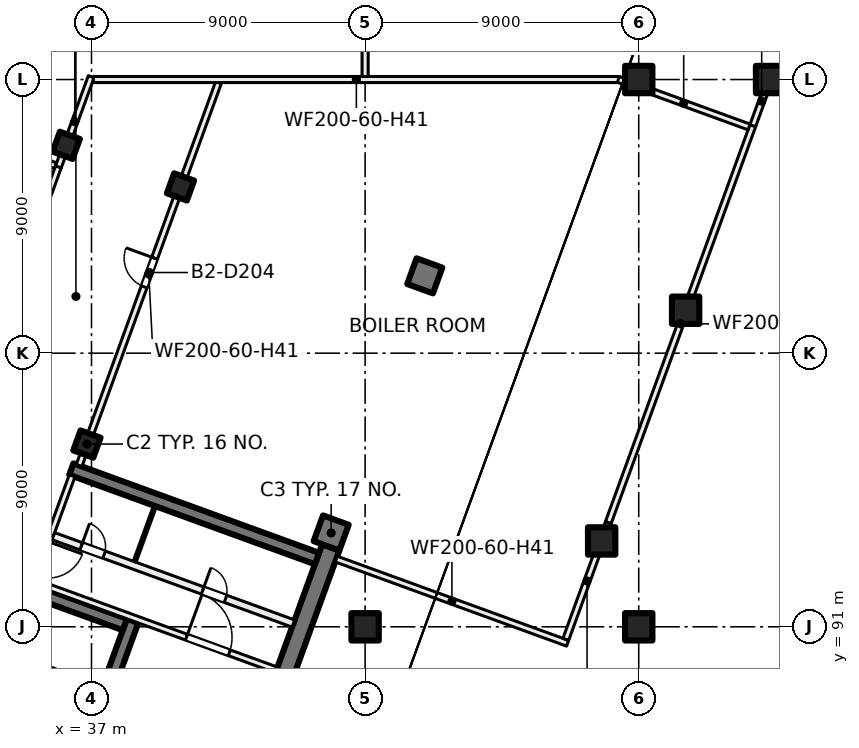
"""IFC4 building model, lengths in metres.
Left out: names, types, materials, properties, quantities, classifications, styles, units other than length and angle.
Written with IfcOpenShell. Run it as: python <this file> out.ifc"""

import sys

from ifc_helpers import new_model, si_unit, direction, frame, frame_2d, origin, origin_2d, place, context, subcontext, project, spatial, rectangle, extrude, element, fill, save


model = new_model("IFC4")
c1 = context("Model", 3, precision=1e-05, world=origin(), true_north=direction((0.0, 1.0)))
c2 = subcontext(c1, "Body", "Model", "MODEL_VIEW")
j1 = project(units=[si_unit("LENGTHUNIT", "METRE"), si_unit("PLANEANGLEUNIT", "RADIAN")], contexts=[c1])
p1 = place(None, origin())
s1 = spatial("IfcSite", under=j1, at=p1, CompositionType="ELEMENT")
p2 = place(p1, origin())
s2 = spatial("IfcBuilding", under=s1, at=p2, CompositionType="ELEMENT")
p3 = place(p2, frame((0.0, 0.0, -9.0)))
s3 = spatial("IfcBuildingStorey", under=s2, at=p3, CompositionType="ELEMENT", Elevation=-9.0)
p4 = place(p3, frame((110.368, 100.798, 0.0), z_axis=(0.0, 0.0, 1.0), x_axis=(-0.866702553925, -0.498825303107, 0.0)))
e1 = element("IfcWall", 1, at=p4, inside=s3, PredefinedType="SHEAR", context=c2, shape_type="SweptSolid", body=[
    extrude(rectangle(XDim=66.651, YDim=0.6, at=frame_2d((33.325, 0.0))), origin(), (0.0, 0.0, 1.0), 4.5),
])
for number, where, z_axis, x_axis in (
    (2, (46.0, 91.0, 0.0), (0.0, 0.0, 1.0), (1.0, 0.0, 0.0)),
    (3, (55.0, 91.0, 0.0), (0.0, 0.0, 1.0), (1.0, 0.0, 0.0)),
    (4, (55.0, 109.0, 0.0), (0.0, 0.0, 1.0), (1.0, 0.0, 0.0)),
    (5, (53.78, 93.824, 0.0), (0.0, 0.0, 1.0), (1.0, 0.0, 0.0)),
    (6, (56.542, 101.412, 0.0), (0.0, 0.0, 1.0), (1.0, 0.0, 0.0)),
    (7, (59.304, 109.0, 0.0), (0.0, 0.0, 1.0), (1.0, 0.0, 0.0)),
):
    element("IfcColumn", number, at=place(p3, frame(where, z_axis=z_axis, x_axis=x_axis)), inside=s3, PredefinedType="COLUMN", context=c2, shape_type="SweptSolid", body=[
        extrude(rectangle(XDim=0.9, YDim=0.9, at=origin_2d()), origin(), (0.0, 0.0, 1.0), 4.5),
    ])
for number, where, z_axis, x_axis in (
    (8, (39.927, 105.468, 0.0), (0.0, 0.0, 1.0), (-0.342, -0.94, 0.0)),
    (9, (36.849, 97.011, 0.0), (0.0, 0.0, 1.0), (-0.342, -0.94, 0.0)),
    (10, (36.169, 106.836, 0.0), (0.0, 0.0, 1.0), (-0.342, -0.94, 0.0)),
):
    element("IfcColumn", number, at=place(p3, frame(where, z_axis=z_axis, x_axis=x_axis)), inside=s3, PredefinedType="COLUMN", context=c2, shape_type="SweptSolid", body=[
        extrude(rectangle(XDim=0.7, YDim=0.7, at=origin_2d()), origin(), (0.0, 0.0, 1.0), 4.5),
    ])
for number, where, z_axis, x_axis in (
    (11, (47.962, 102.544, 0.0), (0.0, 0.0, 1.0), (-0.342, -0.94, 0.0)),
    (12, (44.884, 94.087, 0.0), (0.0, 0.0, 1.0), (-0.342, -0.94, 0.0)),
):
    element("IfcColumn", number, at=place(p3, frame(where, z_axis=z_axis, x_axis=x_axis)), inside=s3, PredefinedType="COLUMN", context=c2, shape_type="SweptSolid", body=[
        extrude(rectangle(XDim=0.9, YDim=0.9, at=origin_2d()), origin(), (0.0, 0.0, 1.0), 4.5),
    ])
p5 = place(p3, frame((41.827, 85.249, 0.0), z_axis=(0.0, 0.0, 1.0), x_axis=(0.342016162452, 0.939694069696, 0.0)))
e13 = element("IfcWall", 13, at=p5, inside=s3, PredefinedType="SHEAR", context=c2, shape_type="SweptSolid", body=[
    extrude(rectangle(XDim=8.9, YDim=0.6, at=frame_2d((4.45, 0.0))), origin(), (0.0, 0.0, 1.0), 4.5),
])
p6 = place(p3, frame((34.178, 79.732, 0.0), z_axis=(0.0, 0.0, 1.0), x_axis=(0.342014590177, 0.939694641948, 0.0)))
e14 = element("IfcWall", 14, at=p6, inside=s3, PredefinedType="SHEAR", context=c2, shape_type="SweptSolid", body=[
    extrude(rectangle(XDim=12.2, YDim=0.4, at=frame_2d((6.1, 0.0))), origin(), (0.0, 0.0, 1.0), 4.5),
])
p7 = place(p3, frame((37.274, 88.822, 0.0), z_axis=(0.0, 0.0, 1.0), x_axis=(-0.939686455819, 0.342037080957, 0.0)))
e15 = element("IfcWall", 15, at=p7, inside=s3, PredefinedType="SHEAR", context=c2, shape_type="SweptSolid", body=[
    extrude(rectangle(XDim=3.0, YDim=0.4, at=frame_2d((1.5, 0.0))), origin(), (0.0, 0.0, 1.0), 4.5),
])
p8 = place(p3, frame((38.095, 91.077, 0.0), z_axis=(0.0, 0.0, 1.0), x_axis=(-0.939676934218, 0.342063238742, 0.0)))
e16 = element("IfcWall", 16, at=p8, inside=s3, PredefinedType="SHEAR", context=c2, shape_type="SweptSolid", body=[
    extrude(rectangle(XDim=3.0, YDim=0.4, at=frame_2d((1.5, 0.0))), origin(), (0.0, 0.0, 1.0), 4.5),
])
p9 = place(p3, frame((44.418, 93.245, 0.0), z_axis=(0.0, 0.0, 1.0), x_axis=(-0.93969060187, 0.342025690201, 0.0)))
e17 = element("IfcWall", 17, at=p9, inside=s3, PredefinedType="SHEAR", context=c2, shape_type="SweptSolid", body=[
    extrude(rectangle(XDim=8.6, YDim=0.4, at=frame_2d((4.3, 0.0))), origin(), (0.0, 0.0, 1.0), 4.5),
])
p10 = place(p3, frame((36.362, 95.964, 0.0), z_axis=(0.0, 0.0, 1.0), x_axis=(-0.341995824804, -0.939701471648, 0.0)))
e18 = element("IfcWall", 18, at=p10, inside=s3, PredefinedType="PARTITIONING", context=c2, shape_type="SweptSolid", body=[
    extrude(rectangle(XDim=3.8, YDim=0.2, at=frame_2d((1.9, 0.0))), origin(), (0.0, 0.0, 1.0), 4.125),
])
p11 = place(p10, frame((2.3, 0.0, 0.0)))
e19 = element("IfcOpeningElement", 19, at=p11, cuts=e18, PredefinedType="OPENING", context=c2, shape_type="SweptSolid", body=[
    extrude(rectangle(XDim=1.2, YDim=2.1, at=frame_2d((0.6, 1.05))), frame((0.0, 0.11, 0.0), z_axis=(0.0, -1.0, 0.0), x_axis=(1.0, 0.0, 0.0)), (0.0, 0.0, 1.0), 0.22),
])
p12 = place(p3, frame((35.19, 92.453, 0.0), z_axis=(0.0, 0.0, 1.0), x_axis=(0.939691552312, -0.342023078919, 0.0)))
e20 = element("IfcWall", 20, at=p12, inside=s3, PredefinedType="PARTITIONING", context=c2, shape_type="SweptSolid", body=[
    extrude(rectangle(XDim=8.4, YDim=0.2, at=frame_2d((4.2, 0.0))), origin(), (0.0, 0.0, 1.0), 4.125),
])
p13 = place(p12, frame((5.25, 0.0, 0.0)))
e21 = element("IfcOpeningElement", 21, at=p13, cuts=e20, PredefinedType="OPENING", context=c2, shape_type="SweptSolid", body=[
    extrude(rectangle(XDim=1.5, YDim=2.1, at=frame_2d((0.75, 1.05))), frame((0.0, 0.11, 0.0), z_axis=(0.0, -1.0, 0.0), x_axis=(1.0, 0.0, 0.0)), (0.0, 0.0, 1.0), 0.22),
])
p14 = place(p3, frame((35.746, 93.98, 0.0), z_axis=(0.0, 0.0, 1.0), x_axis=(0.939691552312, -0.342023078919, 0.0)))
e22 = element("IfcWall", 22, at=p14, inside=s3, PredefinedType="PARTITIONING", context=c2, shape_type="SweptSolid", body=[
    extrude(rectangle(XDim=8.4, YDim=0.25, at=frame_2d((4.2, 0.0))), origin(), (0.0, 0.0, 1.0), 4.125),
])
p15 = place(p14, frame((0.975, 0.0, 0.0)))
e23 = element("IfcOpeningElement", 23, at=p15, cuts=e22, PredefinedType="OPENING", context=c2, shape_type="SweptSolid", body=[
    extrude(rectangle(XDim=0.8, YDim=2.1, at=frame_2d((0.4, 1.05))), frame((0.0, 0.135, 0.0), z_axis=(0.0, -1.0, 0.0), x_axis=(1.0, 0.0, 0.0)), (0.0, 0.0, 1.0), 0.27),
])
p16 = place(p14, frame((5.225, 0.0, 0.0)))
e24 = element("IfcOpeningElement", 24, at=p16, cuts=e22, PredefinedType="OPENING", context=c2, shape_type="SweptSolid", body=[
    extrude(rectangle(XDim=0.8, YDim=2.1, at=frame_2d((0.4, 1.05))), frame((0.0, 0.135, 0.0), z_axis=(0.0, -1.0, 0.0), x_axis=(1.0, 0.0, 0.0)), (0.0, 0.0, 1.0), 0.27),
])
p17 = place(p3, frame((39.087, 94.973, 0.0), z_axis=(0.0, 0.0, 1.0), x_axis=(-0.342024501273, -0.939691034611, 0.0)))
e25 = element("IfcWall", 25, at=p17, inside=s3, PredefinedType="PARTITIONING", context=c2, shape_type="SweptSolid", body=[
    extrude(rectangle(XDim=1.95, YDim=0.1, at=frame_2d((0.975, 0.0))), origin(), (0.0, 0.0, 1.0), 4.125),
])
p18 = place(p3, frame((28.031, 109.0, 0.0), z_axis=(0.0, 0.0, 1.0), x_axis=(0.939666055337, -0.342093122479, 0.0)))
e26 = element("IfcWall", 26, at=p18, inside=s3, PredefinedType="PARTITIONING", context=c2, shape_type="SweptSolid", body=[
    extrude(rectangle(XDim=8.287, YDim=0.2, at=frame_2d((4.144, 0.0))), origin(), (0.0, 0.0, 1.0), 4.125),
])
p19 = place(p3, frame((32.834, 97.674, 0.0), z_axis=(0.0, 0.0, 1.0), x_axis=(0.3420218461, 0.939692001025, 0.0)))
e27 = element("IfcWall", 27, at=p19, inside=s3, PredefinedType="PARTITIONING", context=c2, shape_type="SweptSolid", body=[
    extrude(rectangle(XDim=9.0, YDim=0.2, at=frame_2d((4.5, 0.0))), origin(), (0.0, 0.0, 1.0), 4.125),
])
p20 = place(p19, frame((4.002, 0.0, 0.0)))
e28 = element("IfcOpeningElement", 28, at=p20, cuts=e27, PredefinedType="OPENING", context=c2, shape_type="SweptSolid", body=[
    extrude(rectangle(XDim=1.0, YDim=2.1, at=frame_2d((0.5, 1.05))), frame((0.0, 0.11, 0.0), z_axis=(0.0, -1.0, 0.0), x_axis=(1.0, 0.0, 0.0)), (0.0, 0.0, 1.0), 0.22),
])
p21 = place(p3, frame((35.911, 106.127, 0.0), z_axis=(0.0, 0.0, 1.0), x_axis=(0.341792733582, 0.939775360004, 0.0)))
e29 = element("IfcWall", 29, at=p21, inside=s3, PredefinedType="PARTITIONING", context=c2, shape_type="SweptSolid", body=[
    extrude(rectangle(XDim=3.157, YDim=0.2, at=frame_2d((1.579, 0.0))), origin(), (0.0, 0.0, 1.0), 4.125),
])
p22 = place(p3, frame((41.177, 108.9, 0.0), z_axis=(0.0, 0.0, 1.0), x_axis=(-0.342029721619, -0.939689134517, 0.0)))
e30 = element("IfcWall", 30, at=p22, inside=s3, PredefinedType="PARTITIONING", context=c2, shape_type="SweptSolid", body=[
    extrude(rectangle(XDim=13.402, YDim=0.2, at=frame_2d((6.701, 0.0))), origin(), (0.0, 0.0, 1.0), 4.125),
])
p23 = place(p22, frame((6.148, 0.0, 0.0)))
e31 = element("IfcOpeningElement", 31, at=p23, cuts=e30, PredefinedType="OPENING", context=c2, shape_type="SweptSolid", body=[
    extrude(rectangle(XDim=1.0, YDim=2.1, at=frame_2d((0.5, 1.05))), frame((0.0, 0.11, 0.0), z_axis=(0.0, -1.0, 0.0), x_axis=(1.0, 0.0, 0.0)), (0.0, 0.0, 1.0), 0.22),
])
p24 = place(p3, frame((37.062, 109.0, 0.0), z_axis=(0.0, 0.0, 1.0), x_axis=(1.0, 0.0, 0.0)))
e32 = element("IfcWall", 32, at=p24, inside=s3, PredefinedType="PARTITIONING", context=c2, shape_type="SweptSolid", body=[
    extrude(rectangle(XDim=17.301, YDim=0.2, at=frame_2d((8.65, 0.0))), origin(), (0.0, 0.0, 1.0), 4.125),
])
p25 = place(p3, frame((45.05, 93.228, 0.0), z_axis=(0.0, 0.0, 1.0), x_axis=(0.939696574218, -0.342009281166, 0.0)))
e33 = element("IfcWall", 33, at=p25, inside=s3, PredefinedType="PARTITIONING", context=c2, shape_type="SweptSolid", body=[
    extrude(rectangle(XDim=8.099, YDim=0.2, at=frame_2d((4.05, 0.0))), origin(), (0.0, 0.0, 1.0), 4.125),
])
p26 = place(p3, frame((46.0, 109.1, 0.0), z_axis=(0.0, 0.0, 1.0), x_axis=(0.0, 1.0, 0.0)))
e34 = element("IfcWall", 34, at=p26, inside=s3, PredefinedType="PARTITIONING", context=c2, shape_type="SweptSolid", body=[
    extrude(rectangle(XDim=16.8, YDim=0.2, at=frame_2d((8.4, 0.0))), origin(), (0.0, 0.0, 1.0), 4.125),
])
p27 = place(p3, frame((52.601, 90.586, 0.0), z_axis=(0.0, 0.0, 1.0), x_axis=(0.342059390164, 0.939678335177, 0.0)))
e35 = element("IfcWall", 35, at=p27, inside=s3, PredefinedType="PARTITIONING", context=c2, shape_type="SweptSolid", body=[
    extrude(rectangle(XDim=4.09, YDim=0.2, at=frame_2d((2.045, 0.0))), origin(), (0.0, 0.0, 1.0), 4.125),
])
p28 = place(p3, frame((54.0, 94.429, 0.0), z_axis=(0.0, 0.0, 1.0), x_axis=(0.342057301943, 0.939679095323, 0.0)))
e36 = element("IfcWall", 36, at=p28, inside=s3, PredefinedType="PARTITIONING", context=c2, shape_type="SweptSolid", body=[
    extrude(rectangle(XDim=13.91, YDim=0.2, at=frame_2d((6.955, 0.0))), origin(), (0.0, 0.0, 1.0), 4.125),
])
p29 = place(p3, frame((54.328, 109.006, 0.0), z_axis=(0.0, 0.0, 1.0), x_axis=(0.939667244136, -0.342089857053, 0.0)))
e37 = element("IfcWall", 37, at=p29, inside=s3, PredefinedType="PARTITIONING", context=c2, shape_type="SweptSolid", body=[
    extrude(rectangle(XDim=4.578, YDim=0.2, at=frame_2d((2.289, 0.0))), origin(), (0.0, 0.0, 1.0), 4.125),
])
p30 = place(p3, frame((58.751, 107.481, 0.0), z_axis=(0.0, 0.0, 1.0), x_axis=(0.341925778056, 0.93972696157, 0.0)))
e38 = element("IfcWall", 38, at=p30, inside=s3, PredefinedType="PARTITIONING", context=c2, shape_type="SweptSolid", body=[
    extrude(rectangle(XDim=1.717, YDim=0.2, at=frame_2d((0.858, 0.0))), origin(), (0.0, 0.0, 1.0), 4.125),
])
p31 = place(p3, frame((59.41, 109.0, 0.0), z_axis=(0.0, 0.0, 1.0), x_axis=(1.0, 0.0, 0.0)))
e39 = element("IfcWall", 39, at=p31, inside=s3, PredefinedType="PARTITIONING", context=c2, shape_type="SweptSolid", body=[
    extrude(rectangle(XDim=4.59, YDim=0.2, at=frame_2d((2.295, 0.0))), origin(), (0.0, 0.0, 1.0), 4.125),
])
p32 = place(p13, origin())
e40 = element("IfcDoor", 40, at=p32, inside=s3, OperationType="DOUBLE_DOOR_SINGLE_SWING", PredefinedType="DOOR", context=c2, shape_type="SweptSolid", body=[
    extrude(rectangle(XDim=1.5, YDim=2.1, at=frame_2d((0.75, 1.05))), frame((0.0, 0.025, 0.0), z_axis=(0.0, -1.0, 0.0), x_axis=(1.0, 0.0, 0.0)), (0.0, 0.0, 1.0), 0.05),
])
fill(e21, e40)
p33 = place(p15, origin())
e41 = element("IfcDoor", 41, at=p33, inside=s3, OperationType="SINGLE_SWING_RIGHT", PredefinedType="DOOR", context=c2, shape_type="SweptSolid", body=[
    extrude(rectangle(XDim=0.8, YDim=2.1, at=frame_2d((0.4, 1.05))), frame((0.0, 0.025, 0.0), z_axis=(0.0, -1.0, 0.0), x_axis=(1.0, 0.0, 0.0)), (0.0, 0.0, 1.0), 0.05),
])
fill(e23, e41)
p34 = place(p16, origin())
e42 = element("IfcDoor", 42, at=p34, inside=s3, OperationType="SINGLE_SWING_LEFT", PredefinedType="DOOR", context=c2, shape_type="SweptSolid", body=[
    extrude(rectangle(XDim=0.8, YDim=2.1, at=frame_2d((0.4, 1.05))), frame((0.0, 0.025, 0.0), z_axis=(0.0, -1.0, 0.0), x_axis=(1.0, 0.0, 0.0)), (0.0, 0.0, 1.0), 0.05),
])
fill(e24, e42)
p35 = place(p23, origin())
e43 = element("IfcDoor", 43, at=p35, inside=s3, OperationType="SINGLE_SWING_LEFT", PredefinedType="DOOR", context=c2, shape_type="SweptSolid", body=[
    extrude(rectangle(XDim=1.0, YDim=2.1, at=frame_2d((0.5, 1.05))), frame((0.0, 0.025, 0.0), z_axis=(0.0, -1.0, 0.0), x_axis=(1.0, 0.0, 0.0)), (0.0, 0.0, 1.0), 0.05),
])
fill(e31, e43)
save(model, sys.argv[1])
